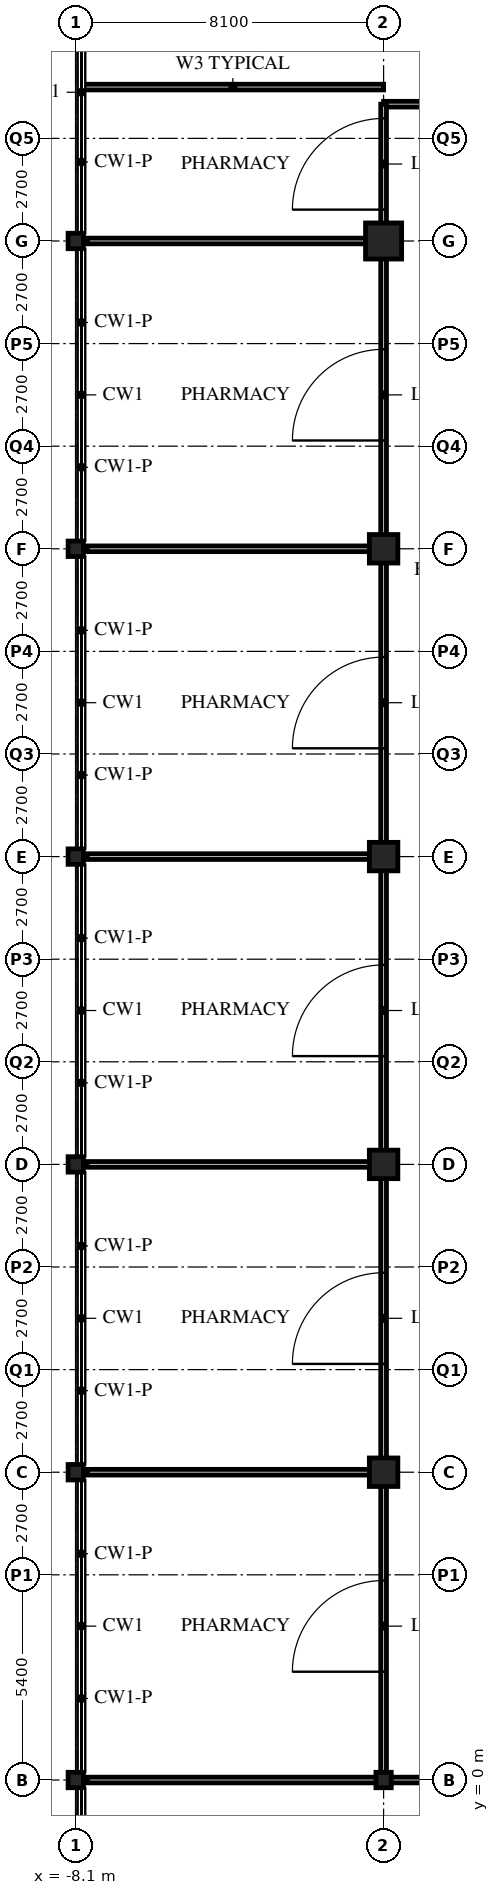
"""IFC4 building model, lengths in metres.
Left out: names, types, materials, properties, quantities, classifications, styles, units other than length and angle.
Written with IfcOpenShell. Run it as: python <this file> out.ifc"""

import sys

from ifc_helpers import new_model, si_unit, direction, frame, frame_2d, origin, origin_with_axes, origin_2d, place, context, subcontext, project, spatial, rectangle, hollow_rectangle, i_section, extrude, element, fill, save


model = new_model("IFC4")
c1 = context("Model", 3, precision=1e-05, world=origin(), true_north=direction((0.0, 1.0)))
c2 = subcontext(c1, "Body", "Model", "MODEL_VIEW")
j1 = project(units=[si_unit("LENGTHUNIT", "METRE"), si_unit("PLANEANGLEUNIT", "RADIAN")], contexts=[c1])
p1 = place(None, origin())
s1 = spatial("IfcSite", under=j1, at=p1, CompositionType="ELEMENT")
p2 = place(p1, origin())
s2 = spatial("IfcBuilding", under=s1, at=p2, CompositionType="ELEMENT")
p3 = place(p2, frame((0.0, 0.0, 6.0)))
s3 = spatial("IfcBuildingStorey", under=s2, at=p3, CompositionType="ELEMENT", Elevation=6.0)
for number, where, z_axis, x_axis in (
    (1, (-8.1, 0.0, 0.0), (0.0, 0.0, 1.0), (1.0, 0.0, 0.0)),
    (2, (-8.1, 8.1, 0.0), (0.0, 0.0, 1.0), (1.0, 0.0, 0.0)),
    (3, (-8.1, 16.2, 0.0), (0.0, 0.0, 1.0), (1.0, 0.0, 0.0)),
    (4, (-8.1, 24.3, 0.0), (0.0, 0.0, 1.0), (1.0, 0.0, 0.0)),
    (5, (-8.1, 32.4, 0.0), (0.0, 0.0, 1.0), (1.0, 0.0, 0.0)),
    (6, (-8.1, 40.5, 0.0), (0.0, 0.0, 1.0), (1.0, 0.0, 0.0)),
    (7, (0.0, 0.0, 0.0), (0.0, 0.0, 1.0), (1.0, 0.0, 0.0)),
):
    element("IfcColumn", number, at=place(p3, frame(where, z_axis=z_axis, x_axis=x_axis)), inside=s3, PredefinedType="COLUMN", context=c2, shape_type="SweptSolid", body=[
        extrude(i_section(OverallWidth=0.403, OverallDepth=0.406, WebThickness=0.027, FlangeThickness=0.043, FilletRadius=0.015, at=origin_2d()), origin(), (0.0, 0.0, 1.0), 5.4),
    ])
for number, where, z_axis, x_axis in (
    (8, (0.0, 8.1, 0.0), (0.0, 0.0, 1.0), (1.0, 0.0, 0.0)),
    (9, (0.0, 16.2, 0.0), (0.0, 0.0, 1.0), (1.0, 0.0, 0.0)),
    (10, (0.0, 24.3, 0.0), (0.0, 0.0, 1.0), (1.0, 0.0, 0.0)),
    (11, (0.0, 32.4, 0.0), (0.0, 0.0, 1.0), (1.0, 0.0, 0.0)),
):
    element("IfcColumn", number, at=place(p3, frame(where, z_axis=z_axis, x_axis=x_axis)), inside=s3, PredefinedType="COLUMN", context=c2, shape_type="SweptSolid", body=[
        extrude(hollow_rectangle(XDim=0.75, YDim=0.75, WallThickness=0.07, at=origin_2d()), origin(), (0.0, 0.0, 1.0), 5.4),
    ])
p4 = place(p3, frame((0.0, 40.5, 0.0), z_axis=(0.0, 0.0, 1.0), x_axis=(1.0, 0.0, 0.0)))
e12 = element("IfcColumn", 12, at=p4, inside=s3, PredefinedType="COLUMN", context=c2, shape_type="SweptSolid", body=[
    extrude(hollow_rectangle(XDim=0.95, YDim=0.95, WallThickness=0.1, at=origin_2d()), origin(), (0.0, 0.0, 1.0), 5.4),
])
p5 = place(p3, origin_with_axes())
e13 = element("IfcWall", 13, at=p5, inside=s3, PredefinedType="PARTITIONING", context=c2, shape_type="SweptSolid", body=[
    extrude(rectangle(XDim=56.7, YDim=0.15, at=frame_2d((28.35, 0.0))), origin(), (0.0, 0.0, 1.0), 4.538),
])
p6 = place(p5, frame((10.95, 0.0, 0.0)))
e14 = element("IfcOpeningElement", 14, at=p6, cuts=e13, PredefinedType="OPENING", context=c2, shape_type="SweptSolid", body=[
    extrude(rectangle(XDim=2.4, YDim=2.7, at=frame_2d((1.2, 1.35))), frame((0.0, 0.085, 0.0), z_axis=(0.0, -1.0, 0.0), x_axis=(1.0, 0.0, 0.0)), (0.0, 0.0, 1.0), 0.17),
])
p7 = place(p5, frame((19.05, 0.0, 0.0)))
e15 = element("IfcOpeningElement", 15, at=p7, cuts=e13, PredefinedType="OPENING", context=c2, shape_type="SweptSolid", body=[
    extrude(rectangle(XDim=2.4, YDim=2.7, at=frame_2d((1.2, 1.35))), frame((0.0, 0.085, 0.0), z_axis=(0.0, -1.0, 0.0), x_axis=(1.0, 0.0, 0.0)), (0.0, 0.0, 1.0), 0.17),
])
p8 = place(p5, frame((27.15, 0.0, 0.0)))
e16 = element("IfcOpeningElement", 16, at=p8, cuts=e13, PredefinedType="OPENING", context=c2, shape_type="SweptSolid", body=[
    extrude(rectangle(XDim=2.4, YDim=2.7, at=frame_2d((1.2, 1.35))), frame((0.0, 0.085, 0.0), z_axis=(0.0, -1.0, 0.0), x_axis=(1.0, 0.0, 0.0)), (0.0, 0.0, 1.0), 0.17),
])
p9 = place(p5, frame((35.25, 0.0, 0.0)))
e17 = element("IfcOpeningElement", 17, at=p9, cuts=e13, PredefinedType="OPENING", context=c2, shape_type="SweptSolid", body=[
    extrude(rectangle(XDim=2.4, YDim=2.7, at=frame_2d((1.2, 1.35))), frame((0.0, 0.085, 0.0), z_axis=(0.0, -1.0, 0.0), x_axis=(1.0, 0.0, 0.0)), (0.0, 0.0, 1.0), 0.17),
])
p10 = place(p5, frame((43.35, 0.0, 0.0)))
e18 = element("IfcOpeningElement", 18, at=p10, cuts=e13, PredefinedType="OPENING", context=c2, shape_type="SweptSolid", body=[
    extrude(rectangle(XDim=2.4, YDim=2.7, at=frame_2d((1.2, 1.35))), frame((0.0, 0.085, 0.0), z_axis=(0.0, -1.0, 0.0), x_axis=(1.0, 0.0, 0.0)), (0.0, 0.0, 1.0), 0.17),
])
p11 = place(p5, frame((2.85, 0.0, 0.0)))
e19 = element("IfcOpeningElement", 19, at=p11, cuts=e13, PredefinedType="OPENING", context=c2, shape_type="SweptSolid", body=[
    extrude(rectangle(XDim=2.4, YDim=2.7, at=frame_2d((1.2, 1.35))), frame((0.0, 0.085, 0.0), z_axis=(0.0, -1.0, 0.0), x_axis=(1.0, 0.0, 0.0)), (0.0, 0.0, 1.0), 0.17),
])
p12 = place(p5, frame((51.45, 0.0, 0.0)))
e20 = element("IfcOpeningElement", 20, at=p12, cuts=e13, PredefinedType="OPENING", context=c2, shape_type="SweptSolid", body=[
    extrude(rectangle(XDim=2.4, YDim=2.7, at=frame_2d((1.2, 1.35))), frame((0.0, 0.085, 0.0), z_axis=(0.0, -1.0, 0.0), x_axis=(1.0, 0.0, 0.0)), (0.0, 0.0, 1.0), 0.17),
])
p13 = place(p3, frame((0.0, 44.1, 0.0), z_axis=(0.0, 0.0, 1.0), x_axis=(1.0, 0.0, 0.0)))
e21 = element("IfcWall", 21, at=p13, inside=s3, PredefinedType="PARTITIONING", context=c2, shape_type="SweptSolid", body=[
    extrude(rectangle(XDim=56.7, YDim=0.15, at=frame_2d((28.35, 0.0))), origin(), (0.0, 0.0, 1.0), 5.15),
])
p14 = place(p13, frame((10.95, 0.0, 0.0)))
e22 = element("IfcOpeningElement", 22, at=p14, cuts=e21, PredefinedType="OPENING", context=c2, shape_type="SweptSolid", body=[
    extrude(rectangle(XDim=2.4, YDim=2.7, at=frame_2d((1.2, 1.35))), frame((0.0, 0.085, 0.0), z_axis=(0.0, -1.0, 0.0), x_axis=(1.0, 0.0, 0.0)), (0.0, 0.0, 1.0), 0.17),
])
p15 = place(p13, frame((19.05, 0.0, 0.0)))
e23 = element("IfcOpeningElement", 23, at=p15, cuts=e21, PredefinedType="OPENING", context=c2, shape_type="SweptSolid", body=[
    extrude(rectangle(XDim=2.4, YDim=2.7, at=frame_2d((1.2, 1.35))), frame((0.0, 0.085, 0.0), z_axis=(0.0, -1.0, 0.0), x_axis=(1.0, 0.0, 0.0)), (0.0, 0.0, 1.0), 0.17),
])
p16 = place(p13, frame((27.15, 0.0, 0.0)))
e24 = element("IfcOpeningElement", 24, at=p16, cuts=e21, PredefinedType="OPENING", context=c2, shape_type="SweptSolid", body=[
    extrude(rectangle(XDim=2.4, YDim=2.7, at=frame_2d((1.2, 1.35))), frame((0.0, 0.085, 0.0), z_axis=(0.0, -1.0, 0.0), x_axis=(1.0, 0.0, 0.0)), (0.0, 0.0, 1.0), 0.17),
])
p17 = place(p13, frame((35.25, 0.0, 0.0)))
e25 = element("IfcOpeningElement", 25, at=p17, cuts=e21, PredefinedType="OPENING", context=c2, shape_type="SweptSolid", body=[
    extrude(rectangle(XDim=2.4, YDim=2.7, at=frame_2d((1.2, 1.35))), frame((0.0, 0.085, 0.0), z_axis=(0.0, -1.0, 0.0), x_axis=(1.0, 0.0, 0.0)), (0.0, 0.0, 1.0), 0.17),
])
p18 = place(p13, frame((43.35, 0.0, 0.0)))
e26 = element("IfcOpeningElement", 26, at=p18, cuts=e21, PredefinedType="OPENING", context=c2, shape_type="SweptSolid", body=[
    extrude(rectangle(XDim=2.4, YDim=2.7, at=frame_2d((1.2, 1.35))), frame((0.0, 0.085, 0.0), z_axis=(0.0, -1.0, 0.0), x_axis=(1.0, 0.0, 0.0)), (0.0, 0.0, 1.0), 0.17),
])
p19 = place(p13, frame((53.45, 0.0, 0.0)))
e27 = element("IfcOpeningElement", 27, at=p19, cuts=e21, PredefinedType="OPENING", context=c2, shape_type="SweptSolid", body=[
    extrude(rectangle(XDim=2.4, YDim=2.7, at=frame_2d((1.2, 1.35))), frame((0.0, 0.085, 0.0), z_axis=(0.0, -1.0, 0.0), x_axis=(1.0, 0.0, 0.0)), (0.0, 0.0, 1.0), 0.17),
])
p20 = place(p13, frame((4.85, 0.0, 0.0)))
e28 = element("IfcOpeningElement", 28, at=p20, cuts=e21, PredefinedType="OPENING", context=c2, shape_type="SweptSolid", body=[
    extrude(rectangle(XDim=2.4, YDim=2.7, at=frame_2d((1.2, 1.35))), frame((0.0, 0.085, 0.0), z_axis=(0.0, -1.0, 0.0), x_axis=(1.0, 0.0, 0.0)), (0.0, 0.0, 1.0), 0.17),
])
p21 = place(p3, frame((0.0, 0.0, 0.0), z_axis=(0.0, 0.0, 1.0), x_axis=(0.0, 1.0, 0.0)))
e29 = element("IfcWall", 29, at=p21, inside=s3, PredefinedType="PARTITIONING", context=c2, shape_type="SweptSolid", body=[
    extrude(rectangle(XDim=44.1, YDim=0.15, at=frame_2d((22.05, 0.0))), origin(), (0.0, 0.0, 1.0), 4.538),
])
p22 = place(p21, frame((2.85, 0.0, 0.0)))
e30 = element("IfcOpeningElement", 30, at=p22, cuts=e29, PredefinedType="OPENING", context=c2, shape_type="SweptSolid", body=[
    extrude(rectangle(XDim=2.4, YDim=2.7, at=frame_2d((1.2, 1.35))), frame((0.0, 0.085, 0.0), z_axis=(0.0, -1.0, 0.0), x_axis=(1.0, 0.0, 0.0)), (0.0, 0.0, 1.0), 0.17),
])
p23 = place(p21, frame((10.95, 0.0, 0.0)))
e31 = element("IfcOpeningElement", 31, at=p23, cuts=e29, PredefinedType="OPENING", context=c2, shape_type="SweptSolid", body=[
    extrude(rectangle(XDim=2.4, YDim=2.7, at=frame_2d((1.2, 1.35))), frame((0.0, 0.085, 0.0), z_axis=(0.0, -1.0, 0.0), x_axis=(1.0, 0.0, 0.0)), (0.0, 0.0, 1.0), 0.17),
])
p24 = place(p21, frame((19.05, 0.0, 0.0)))
e32 = element("IfcOpeningElement", 32, at=p24, cuts=e29, PredefinedType="OPENING", context=c2, shape_type="SweptSolid", body=[
    extrude(rectangle(XDim=2.4, YDim=2.7, at=frame_2d((1.2, 1.35))), frame((0.0, 0.085, 0.0), z_axis=(0.0, -1.0, 0.0), x_axis=(1.0, 0.0, 0.0)), (0.0, 0.0, 1.0), 0.17),
])
p25 = place(p21, frame((27.15, 0.0, 0.0)))
e33 = element("IfcOpeningElement", 33, at=p25, cuts=e29, PredefinedType="OPENING", context=c2, shape_type="SweptSolid", body=[
    extrude(rectangle(XDim=2.4, YDim=2.7, at=frame_2d((1.2, 1.35))), frame((0.0, 0.085, 0.0), z_axis=(0.0, -1.0, 0.0), x_axis=(1.0, 0.0, 0.0)), (0.0, 0.0, 1.0), 0.17),
])
p26 = place(p21, frame((35.25, 0.0, 0.0)))
e34 = element("IfcOpeningElement", 34, at=p26, cuts=e29, PredefinedType="OPENING", context=c2, shape_type="SweptSolid", body=[
    extrude(rectangle(XDim=2.4, YDim=2.7, at=frame_2d((1.2, 1.35))), frame((0.0, 0.085, 0.0), z_axis=(0.0, -1.0, 0.0), x_axis=(1.0, 0.0, 0.0)), (0.0, 0.0, 1.0), 0.17),
])
p27 = place(p21, frame((41.325, 0.0, 0.0)))
e35 = element("IfcOpeningElement", 35, at=p27, cuts=e29, PredefinedType="OPENING", context=c2, shape_type="SweptSolid", body=[
    extrude(rectangle(XDim=2.4, YDim=2.7, at=frame_2d((1.2, 1.35))), frame((0.0, 0.085, 0.0), z_axis=(0.0, -1.0, 0.0), x_axis=(1.0, 0.0, 0.0)), (0.0, 0.0, 1.0), 0.17),
])
for number, where, z_axis, x_axis in (
    (36, (0.0, 8.1, 0.0), (0.0, 0.0, 1.0), (-1.0, 0.0, 0.0)),
    (37, (0.0, 16.2, 0.0), (0.0, 0.0, 1.0), (-1.0, 0.0, 0.0)),
    (38, (0.0, 24.3, 0.0), (0.0, 0.0, 1.0), (-1.0, 0.0, 0.0)),
    (39, (0.0, 32.4, 0.0), (0.0, 0.0, 1.0), (-1.0, 0.0, 0.0)),
    (40, (0.0, 40.5, 0.0), (0.0, 0.0, 1.0), (-1.0, 0.0, 0.0)),
    (41, (-7.8, 0.0, 0.0), (0.0, 0.0, 1.0), (1.0, 0.0, 0.0)),
):
    element("IfcWall", number, at=place(p3, frame(where, z_axis=z_axis, x_axis=x_axis)), inside=s3, PredefinedType="PARTITIONING", context=c2, shape_type="SweptSolid", body=[
        extrude(rectangle(XDim=7.8, YDim=0.15, at=frame_2d((3.9, 0.0))), origin(), (0.0, 0.0, 1.0), 4.538),
    ])
p28 = place(p3, frame((-7.931, 44.55, 0.0), z_axis=(0.0, 0.0, 1.0), x_axis=(1.0, 0.0, 0.0)))
e42 = element("IfcWall", 42, at=p28, inside=s3, PredefinedType="PARTITIONING", context=c2, shape_type="SweptSolid", body=[
    extrude(rectangle(XDim=7.931, YDim=0.15, at=frame_2d((3.965, 0.0))), origin(), (0.0, 0.0, 1.0), 5.15),
])
p29 = place(p22, origin())
e43 = element("IfcDoor", 43, at=p29, inside=s3, OperationType="DOUBLE_DOOR_SINGLE_SWING", PredefinedType="DOOR", context=c2, shape_type="SweptSolid", body=[
    extrude(rectangle(XDim=2.4, YDim=2.7, at=frame_2d((1.2, 1.35))), frame((0.0, 0.025, 0.0), z_axis=(0.0, -1.0, 0.0), x_axis=(1.0, 0.0, 0.0)), (0.0, 0.0, 1.0), 0.05),
])
fill(e30, e43)
p30 = place(p23, origin())
e44 = element("IfcDoor", 44, at=p30, inside=s3, OperationType="DOUBLE_DOOR_SINGLE_SWING", PredefinedType="DOOR", context=c2, shape_type="SweptSolid", body=[
    extrude(rectangle(XDim=2.4, YDim=2.7, at=frame_2d((1.2, 1.35))), frame((0.0, 0.025, 0.0), z_axis=(0.0, -1.0, 0.0), x_axis=(1.0, 0.0, 0.0)), (0.0, 0.0, 1.0), 0.05),
])
fill(e31, e44)
p31 = place(p24, origin())
e45 = element("IfcDoor", 45, at=p31, inside=s3, OperationType="DOUBLE_DOOR_SINGLE_SWING", PredefinedType="DOOR", context=c2, shape_type="SweptSolid", body=[
    extrude(rectangle(XDim=2.4, YDim=2.7, at=frame_2d((1.2, 1.35))), frame((0.0, 0.025, 0.0), z_axis=(0.0, -1.0, 0.0), x_axis=(1.0, 0.0, 0.0)), (0.0, 0.0, 1.0), 0.05),
])
fill(e32, e45)
p32 = place(p25, origin())
e46 = element("IfcDoor", 46, at=p32, inside=s3, OperationType="DOUBLE_DOOR_SINGLE_SWING", PredefinedType="DOOR", context=c2, shape_type="SweptSolid", body=[
    extrude(rectangle(XDim=2.4, YDim=2.7, at=frame_2d((1.2, 1.35))), frame((0.0, 0.025, 0.0), z_axis=(0.0, -1.0, 0.0), x_axis=(1.0, 0.0, 0.0)), (0.0, 0.0, 1.0), 0.05),
])
fill(e33, e46)
p33 = place(p26, origin())
e47 = element("IfcDoor", 47, at=p33, inside=s3, OperationType="DOUBLE_DOOR_SINGLE_SWING", PredefinedType="DOOR", context=c2, shape_type="SweptSolid", body=[
    extrude(rectangle(XDim=2.4, YDim=2.7, at=frame_2d((1.2, 1.35))), frame((0.0, 0.025, 0.0), z_axis=(0.0, -1.0, 0.0), x_axis=(1.0, 0.0, 0.0)), (0.0, 0.0, 1.0), 0.05),
])
fill(e34, e47)
p34 = place(p27, origin())
e48 = element("IfcDoor", 48, at=p34, inside=s3, OperationType="DOUBLE_DOOR_SINGLE_SWING", PredefinedType="DOOR", context=c2, shape_type="SweptSolid", body=[
    extrude(rectangle(XDim=2.4, YDim=2.7, at=frame_2d((1.2, 1.35))), frame((0.0, 0.025, 0.0), z_axis=(0.0, -1.0, 0.0), x_axis=(1.0, 0.0, 0.0)), (0.0, 0.0, 1.0), 0.05),
])
fill(e35, e48)
save(model, sys.argv[1])
